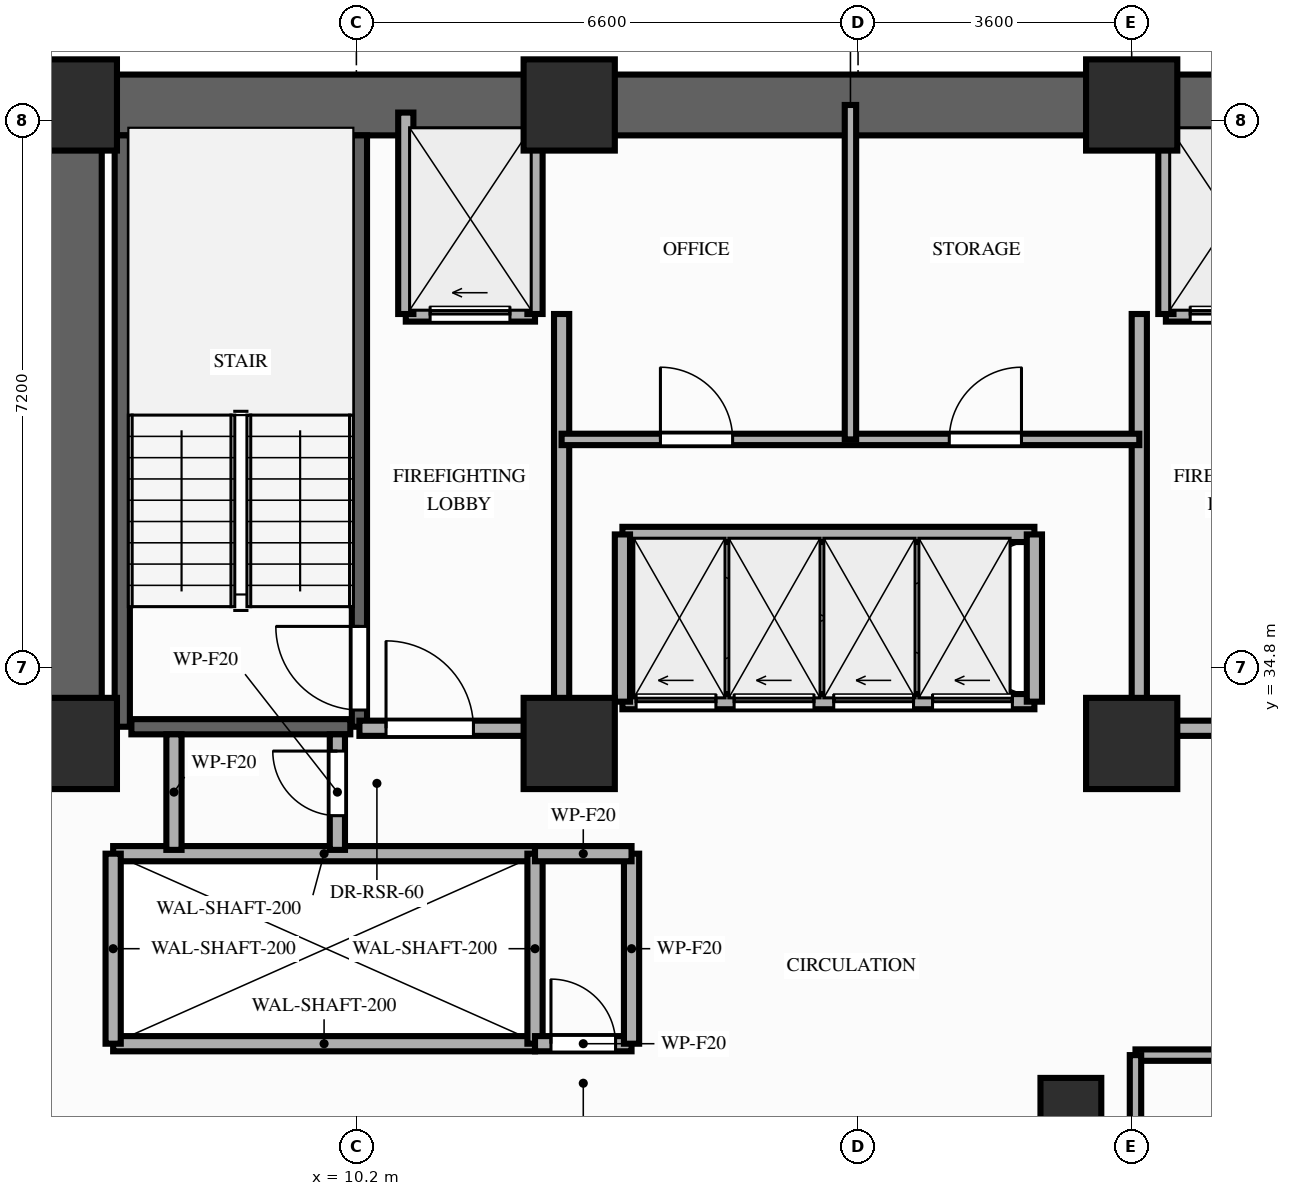
"""IFC4 building model, lengths in metres.
Left out: names, types, materials, properties, quantities, classifications, styles, units other than length and angle.
Written with IfcOpenShell. Run it as: python <this file> out.ifc"""

import sys

from ifc_helpers import new_model, si_unit, direction, frame, frame_2d, origin, origin_2d, place, context, subcontext, project, spatial, rectangle, extrude, element, fill, save


model = new_model("IFC4")
c1 = context("Model", 3, precision=1e-05, world=origin(), true_north=direction((0.0, 1.0)))
c2 = subcontext(c1, "Body", "Model", "MODEL_VIEW")
j1 = project(units=[si_unit("LENGTHUNIT", "METRE"), si_unit("PLANEANGLEUNIT", "RADIAN")], contexts=[c1])
p1 = place(None, origin())
s1 = spatial("IfcSite", under=j1, at=p1, CompositionType="ELEMENT")
p2 = place(p1, origin())
s2 = spatial("IfcBuilding", under=s1, at=p2, CompositionType="ELEMENT")
p3 = place(p2, frame((0.0, 0.0, 99.4)))
s3 = spatial("IfcBuildingStorey", under=s2, at=p3, CompositionType="ELEMENT", Elevation=99.4)
for number, where, z_axis, x_axis in (
    (1, (6.45, 33.8, 0.0), (0.0, 0.0, 1.0), (1.0, 0.0, 0.0)),
    (2, (13.0, 33.8, 0.0), (0.0, 0.0, 1.0), (1.0, 0.0, 0.0)),
    (3, (20.4, 33.8, 0.0), (0.0, 0.0, 1.0), (1.0, 0.0, 0.0)),
    (4, (6.45, 42.2, 0.0), (0.0, 0.0, 1.0), (1.0, 0.0, 0.0)),
    (5, (13.0, 42.2, 0.0), (0.0, 0.0, 1.0), (1.0, 0.0, 0.0)),
    (6, (20.4, 42.2, 0.0), (0.0, 0.0, 1.0), (1.0, 0.0, 0.0)),
):
    element("IfcColumn", number, at=place(p3, frame(where, z_axis=z_axis, x_axis=x_axis)), inside=s3, PredefinedType="COLUMN", context=c2, shape_type="SweptSolid", body=[
        extrude(rectangle(XDim=1.2, YDim=1.2, at=origin_2d()), origin(), (0.0, 0.0, 1.0), 3.2),
    ])
p4 = place(p3, frame((19.6, 28.8, 0.0), z_axis=(0.0, 0.0, 1.0), x_axis=(1.0, 0.0, 0.0)))
e7 = element("IfcColumn", 7, at=p4, inside=s3, PredefinedType="COLUMN", context=c2, shape_type="SweptSolid", body=[
    extrude(rectangle(XDim=0.8, YDim=1.2, at=origin_2d()), origin(), (0.0, 0.0, 1.0), 3.2),
])
p5 = place(p3, frame((6.45, 42.2, 0.0), z_axis=(0.0, 0.0, 1.0), x_axis=(1.0, 0.0, 0.0)))
e8 = element("IfcWall", 8, at=p5, inside=s3, PredefinedType="SHEAR", context=c2, shape_type="SweptSolid", body=[
    extrude(rectangle(XDim=20.45, YDim=0.8, at=frame_2d((10.225, 0.0))), origin(), (0.0, 0.0, 1.0), 2.96),
])
p6 = place(p3, frame((6.45, 33.8, 0.0), z_axis=(0.0, 0.0, 1.0), x_axis=(0.0, 1.0, 0.0)))
e9 = element("IfcWall", 9, at=p6, inside=s3, PredefinedType="SHEAR", context=c2, shape_type="SweptSolid", body=[
    extrude(rectangle(XDim=7.95, YDim=0.8, at=frame_2d((3.975, 0.0))), origin(), (0.0, 0.0, 1.0), 2.96),
])
p7 = place(p3, frame((7.12, 34.02, 0.0), z_axis=(0.0, 0.0, 1.0), x_axis=(0.0, 1.0, 0.0)))
e10 = element("IfcWall", 10, at=p7, inside=s3, PredefinedType="SHEAR", context=c2, shape_type="SweptSolid", body=[
    extrude(rectangle(XDim=7.78, YDim=0.2, at=frame_2d((3.89, 0.0))), origin(), (0.0, 0.0, 1.0), 2.96),
])
p8 = place(p3, frame((10.24, 34.02, 0.0), z_axis=(0.0, 0.0, 1.0), x_axis=(0.0, 1.0, 0.0)))
e11 = element("IfcWall", 11, at=p8, inside=s3, PredefinedType="SHEAR", context=c2, shape_type="SweptSolid", body=[
    extrude(rectangle(XDim=7.78, YDim=0.2, at=frame_2d((3.89, 0.0))), origin(), (0.0, 0.0, 1.0), 2.96),
])
p9 = place(p8, frame((0.22, 0.0, 0.0)))
e12 = element("IfcOpeningElement", 12, at=p9, cuts=e11, PredefinedType="OPENING", context=c2, shape_type="SweptSolid", body=[
    extrude(rectangle(XDim=1.1, YDim=2.15, at=frame_2d((0.55, 1.075))), frame((0.0, 0.11, 0.0), z_axis=(0.0, -1.0, 0.0), x_axis=(1.0, 0.0, 0.0)), (0.0, 0.0, 1.0), 0.22),
])
p10 = place(p3, frame((7.24, 34.02, 0.0), z_axis=(0.0, 0.0, 1.0), x_axis=(1.0, 0.0, 0.0)))
e13 = element("IfcWall", 13, at=p10, inside=s3, PredefinedType="SHEAR", context=c2, shape_type="SweptSolid", body=[
    extrude(rectangle(XDim=2.88, YDim=0.2, at=frame_2d((1.44, 0.0))), origin(), (0.0, 0.0, 1.0), 2.96),
])
for number, where, z_axis, x_axis in (
    (14, (7.0, 29.85, 0.0), (0.0, 0.0, 1.0), (1.0, 0.0, 0.0)),
    (15, (7.0, 32.35, 0.0), (0.0, 0.0, 1.0), (1.0, 0.0, 0.0)),
):
    element("IfcWall", number, at=place(p3, frame(where, z_axis=z_axis, x_axis=x_axis)), inside=s3, PredefinedType="MOVABLE", context=c2, shape_type="SweptSolid", body=[
        extrude(rectangle(XDim=5.55, YDim=0.2, at=frame_2d((2.775, 0.0))), origin(), (0.0, 0.0, 1.0), 2.96),
    ])
for number, where, z_axis, x_axis in (
    (16, (7.0, 29.85, 0.0), (0.0, 0.0, 1.0), (0.0, 1.0, 0.0)),
    (17, (12.55, 29.85, 0.0), (0.0, 0.0, 1.0), (0.0, 1.0, 0.0)),
):
    element("IfcWall", number, at=place(p3, frame(where, z_axis=z_axis, x_axis=x_axis)), inside=s3, PredefinedType="MOVABLE", context=c2, shape_type="SweptSolid", body=[
        extrude(rectangle(XDim=2.5, YDim=0.2, at=frame_2d((1.25, 0.0))), origin(), (0.0, 0.0, 1.0), 2.96),
    ])
p11 = place(p3, frame((10.85, 39.45, 0.0), z_axis=(0.0, 0.0, 1.0), x_axis=(1.0, 0.0, 0.0)))
e18 = element("IfcWall", 18, at=p11, inside=s3, PredefinedType="MOVABLE", context=c2, shape_type="SweptSolid", body=[
    extrude(rectangle(XDim=1.7, YDim=0.2, at=frame_2d((0.85, 0.0))), origin(), (0.0, 0.0, 1.0), 2.96),
])
p12 = place(p11, frame((0.32, 0.0, 0.0)))
e19 = element("IfcOpeningElement", 19, at=p12, cuts=e18, PredefinedType="OPENING", context=c2, shape_type="SweptSolid", body=[
    extrude(rectangle(XDim=1.05, YDim=2.15, at=frame_2d((0.525, 1.075))), frame((0.0, 0.11, 0.0), z_axis=(0.0, -1.0, 0.0), x_axis=(1.0, 0.0, 0.0)), (0.0, 0.0, 1.0), 0.22),
])
p13 = place(p3, frame((20.85, 39.45, 0.0), z_axis=(0.0, 0.0, 1.0), x_axis=(1.0, 0.0, 0.0)))
e20 = element("IfcWall", 20, at=p13, inside=s3, PredefinedType="MOVABLE", context=c2, shape_type="SweptSolid", body=[
    extrude(rectangle(XDim=1.7, YDim=0.2, at=frame_2d((0.85, 0.0))), origin(), (0.0, 0.0, 1.0), 2.96),
])
p14 = place(p13, frame((0.32, 0.0, 0.0)))
e21 = element("IfcOpeningElement", 21, at=p14, cuts=e20, PredefinedType="OPENING", context=c2, shape_type="SweptSolid", body=[
    extrude(rectangle(XDim=1.05, YDim=2.15, at=frame_2d((0.525, 1.075))), frame((0.0, 0.11, 0.0), z_axis=(0.0, -1.0, 0.0), x_axis=(1.0, 0.0, 0.0)), (0.0, 0.0, 1.0), 0.22),
])
for number, where, z_axis, x_axis in (
    (22, (10.85, 39.45, 0.0), (0.0, 0.0, 1.0), (0.0, 1.0, 0.0)),
    (23, (12.55, 39.45, 0.0), (0.0, 0.0, 1.0), (0.0, 1.0, 0.0)),
):
    element("IfcWall", number, at=place(p3, frame(where, z_axis=z_axis, x_axis=x_axis)), inside=s3, PredefinedType="MOVABLE", context=c2, shape_type="SweptSolid", body=[
        extrude(rectangle(XDim=2.65, YDim=0.2, at=frame_2d((1.325, 0.0))), origin(), (0.0, 0.0, 1.0), 2.35),
    ])
p15 = place(p3, frame((12.9, 34.0, 0.0), z_axis=(0.0, 0.0, 1.0), x_axis=(0.0, 1.0, 0.0)))
e24 = element("IfcWall", 24, at=p15, inside=s3, PredefinedType="PARTITIONING", context=c2, shape_type="SweptSolid", body=[
    extrude(rectangle(XDim=5.45, YDim=0.2, at=frame_2d((2.725, 0.0))), origin(), (0.0, 0.0, 1.0), 2.35),
])
p16 = place(p3, frame((10.24, 34.0, 0.0), z_axis=(0.0, 0.0, 1.0), x_axis=(1.0, 0.0, 0.0)))
e25 = element("IfcWall", 25, at=p16, inside=s3, PredefinedType="PARTITIONING", context=c2, shape_type="SweptSolid", body=[
    extrude(rectangle(XDim=2.66, YDim=0.2, at=frame_2d((1.33, 0.0))), origin(), (0.0, 0.0, 1.0), 2.35),
])
p17 = place(p16, frame((0.35, 0.0, 0.0)))
e26 = element("IfcOpeningElement", 26, at=p17, cuts=e25, PredefinedType="OPENING", context=c2, shape_type="SweptSolid", body=[
    extrude(rectangle(XDim=1.15, YDim=2.15, at=frame_2d((0.575, 1.075))), frame((0.0, 0.11, 0.0), z_axis=(0.0, -1.0, 0.0), x_axis=(1.0, 0.0, 0.0)), (0.0, 0.0, 1.0), 0.22),
])
p18 = place(p3, frame((20.85, 39.45, 0.0), z_axis=(0.0, 0.0, 1.0), x_axis=(0.0, 1.0, 0.0)))
e27 = element("IfcWall", 27, at=p18, inside=s3, PredefinedType="MOVABLE", context=c2, shape_type="SweptSolid", body=[
    extrude(rectangle(XDim=2.65, YDim=0.2, at=frame_2d((1.325, 0.0))), origin(), (0.0, 0.0, 1.0), 2.35),
])
p19 = place(p3, frame((20.5, 34.0, 0.0), z_axis=(0.0, 0.0, 1.0), x_axis=(0.0, 1.0, 0.0)))
e28 = element("IfcWall", 28, at=p19, inside=s3, PredefinedType="PARTITIONING", context=c2, shape_type="SweptSolid", body=[
    extrude(rectangle(XDim=5.45, YDim=0.2, at=frame_2d((2.725, 0.0))), origin(), (0.0, 0.0, 1.0), 2.35),
])
p20 = place(p3, frame((20.5, 34.0, 0.0), z_axis=(0.0, 0.0, 1.0), x_axis=(1.0, 0.0, 0.0)))
e29 = element("IfcWall", 29, at=p20, inside=s3, PredefinedType="PARTITIONING", context=c2, shape_type="SweptSolid", body=[
    extrude(rectangle(XDim=2.6, YDim=0.2, at=frame_2d((1.3, 0.0))), origin(), (0.0, 0.0, 1.0), 2.35),
])
p21 = place(p20, frame((1.05, 0.0, 0.0)))
e30 = element("IfcOpeningElement", 30, at=p21, cuts=e29, PredefinedType="OPENING", context=c2, shape_type="SweptSolid", body=[
    extrude(rectangle(XDim=1.15, YDim=2.15, at=frame_2d((0.575, 1.075))), frame((0.0, 0.11, 0.0), z_axis=(0.0, -1.0, 0.0), x_axis=(1.0, 0.0, 0.0)), (0.0, 0.0, 1.0), 0.22),
])
p22 = place(p3, frame((12.55, 29.85, 0.0), z_axis=(0.0, 0.0, 1.0), x_axis=(1.0, 0.0, 0.0)))
e31 = element("IfcWall", 31, at=p22, inside=s3, PredefinedType="PARTITIONING", context=c2, shape_type="SweptSolid", body=[
    extrude(rectangle(XDim=1.27, YDim=0.2, at=frame_2d((0.635, 0.0))), origin(), (0.0, 0.0, 1.0), 2.96),
])
p23 = place(p22, frame((0.21, 0.0, 0.0)))
e32 = element("IfcOpeningElement", 32, at=p23, cuts=e31, PredefinedType="OPENING", context=c2, shape_type="SweptSolid", body=[
    extrude(rectangle(XDim=0.85, YDim=2.05, at=frame_2d((0.425, 1.025))), frame((0.0, 0.11, 0.0), z_axis=(0.0, -1.0, 0.0), x_axis=(1.0, 0.0, 0.0)), (0.0, 0.0, 1.0), 0.22),
])
p24 = place(p3, frame((13.82, 29.85, 0.0), z_axis=(0.0, 0.0, 1.0), x_axis=(0.0, 1.0, 0.0)))
e33 = element("IfcWall", 33, at=p24, inside=s3, PredefinedType="PARTITIONING", context=c2, shape_type="SweptSolid", body=[
    extrude(rectangle(XDim=2.5, YDim=0.2, at=frame_2d((1.25, 0.0))), origin(), (0.0, 0.0, 1.0), 2.96),
])
p25 = place(p3, frame((12.55, 32.35, 0.0), z_axis=(0.0, 0.0, 1.0), x_axis=(1.0, 0.0, 0.0)))
e34 = element("IfcWall", 34, at=p25, inside=s3, PredefinedType="PARTITIONING", context=c2, shape_type="SweptSolid", body=[
    extrude(rectangle(XDim=1.27, YDim=0.2, at=frame_2d((0.635, 0.0))), origin(), (0.0, 0.0, 1.0), 2.96),
])
p26 = place(p3, frame((7.8, 32.4, 0.0), z_axis=(0.0, 0.0, 1.0), x_axis=(0.0, 1.0, 0.0)))
e35 = element("IfcWall", 35, at=p26, inside=s3, PredefinedType="PARTITIONING", context=c2, shape_type="SweptSolid", body=[
    extrude(rectangle(XDim=1.52, YDim=0.2, at=frame_2d((0.76, 0.0))), origin(), (0.0, 0.0, 1.0), 2.35),
])
p27 = place(p3, frame((9.95, 32.4, 0.0), z_axis=(0.0, 0.0, 1.0), x_axis=(0.0, 1.0, 0.0)))
e36 = element("IfcWall", 36, at=p27, inside=s3, PredefinedType="PARTITIONING", context=c2, shape_type="SweptSolid", body=[
    extrude(rectangle(XDim=1.52, YDim=0.2, at=frame_2d((0.76, 0.0))), origin(), (0.0, 0.0, 1.0), 2.35),
])
p28 = place(p27, frame((0.45, 0.0, 0.0)))
e37 = element("IfcOpeningElement", 37, at=p28, cuts=e36, PredefinedType="OPENING", context=c2, shape_type="SweptSolid", body=[
    extrude(rectangle(XDim=0.85, YDim=2.05, at=frame_2d((0.425, 1.025))), frame((0.0, 0.11, 0.0), z_axis=(0.0, -1.0, 0.0), x_axis=(1.0, 0.0, 0.0)), (0.0, 0.0, 1.0), 0.22),
])
p29 = place(p3, frame((12.9, 37.8, 0.0), z_axis=(0.0, 0.0, 1.0), x_axis=(1.0, 0.0, 0.0)))
e38 = element("IfcWall", 38, at=p29, inside=s3, PredefinedType="PARTITIONING", context=c2, shape_type="SweptSolid", body=[
    extrude(rectangle(XDim=7.6, YDim=0.15, at=frame_2d((3.8, 0.0))), origin(), (0.0, 0.0, 1.0), 2.96),
])
p30 = place(p29, frame((1.3, 0.0, 0.0)))
e39 = element("IfcOpeningElement", 39, at=p30, cuts=e38, PredefinedType="OPENING", context=c2, shape_type="SweptSolid", body=[
    extrude(rectangle(XDim=0.95, YDim=2.15, at=frame_2d((0.475, 1.075))), frame((0.0, 0.085, 0.0), z_axis=(0.0, -1.0, 0.0), x_axis=(1.0, 0.0, 0.0)), (0.0, 0.0, 1.0), 0.17),
])
p31 = place(p29, frame((5.1, 0.0, 0.0)))
e40 = element("IfcOpeningElement", 40, at=p31, cuts=e38, PredefinedType="OPENING", context=c2, shape_type="SweptSolid", body=[
    extrude(rectangle(XDim=0.95, YDim=2.15, at=frame_2d((0.475, 1.075))), frame((0.0, 0.085, 0.0), z_axis=(0.0, -1.0, 0.0), x_axis=(1.0, 0.0, 0.0)), (0.0, 0.0, 1.0), 0.17),
])
p32 = place(p3, frame((16.7, 37.8, 0.0), z_axis=(0.0, 0.0, 1.0), x_axis=(0.0, 1.0, 0.0)))
e41 = element("IfcWall", 41, at=p32, inside=s3, PredefinedType="PARTITIONING", context=c2, shape_type="SweptSolid", body=[
    extrude(rectangle(XDim=4.4, YDim=0.15, at=frame_2d((2.2, 0.0))), origin(), (0.0, 0.0, 1.0), 2.35),
])
p33 = place(p3, frame((13.7, 34.35, 0.0), z_axis=(0.0, 0.0, 1.0), x_axis=(1.0, 0.0, 0.0)))
e42 = element("IfcWall", 42, at=p33, inside=s3, PredefinedType="MOVABLE", context=c2, shape_type="SweptSolid", body=[
    extrude(rectangle(XDim=5.42, YDim=0.2, at=frame_2d((2.71, 0.0))), origin(), (0.0, 0.0, 1.0), 2.96),
])
p34 = place(p33, frame((0.18, 0.0, 0.0)))
e43 = element("IfcOpeningElement", 43, at=p34, cuts=e42, PredefinedType="OPENING", context=c2, shape_type="SweptSolid", body=[
    extrude(rectangle(XDim=1.05, YDim=2.15, at=frame_2d((0.525, 1.075))), frame((0.0, 0.11, 0.0), z_axis=(0.0, -1.0, 0.0), x_axis=(1.0, 0.0, 0.0)), (0.0, 0.0, 1.0), 0.22),
])
p35 = place(p33, frame((1.47, 0.0, 0.0)))
e44 = element("IfcOpeningElement", 44, at=p35, cuts=e42, PredefinedType="OPENING", context=c2, shape_type="SweptSolid", body=[
    extrude(rectangle(XDim=1.05, YDim=2.15, at=frame_2d((0.525, 1.075))), frame((0.0, 0.11, 0.0), z_axis=(0.0, -1.0, 0.0), x_axis=(1.0, 0.0, 0.0)), (0.0, 0.0, 1.0), 0.22),
])
p36 = place(p33, frame((2.78, 0.0, 0.0)))
e45 = element("IfcOpeningElement", 45, at=p36, cuts=e42, PredefinedType="OPENING", context=c2, shape_type="SweptSolid", body=[
    extrude(rectangle(XDim=1.05, YDim=2.15, at=frame_2d((0.525, 1.075))), frame((0.0, 0.11, 0.0), z_axis=(0.0, -1.0, 0.0), x_axis=(1.0, 0.0, 0.0)), (0.0, 0.0, 1.0), 0.22),
])
p37 = place(p33, frame((4.08, 0.0, 0.0)))
e46 = element("IfcOpeningElement", 46, at=p37, cuts=e42, PredefinedType="OPENING", context=c2, shape_type="SweptSolid", body=[
    extrude(rectangle(XDim=1.05, YDim=2.15, at=frame_2d((0.525, 1.075))), frame((0.0, 0.11, 0.0), z_axis=(0.0, -1.0, 0.0), x_axis=(1.0, 0.0, 0.0)), (0.0, 0.0, 1.0), 0.22),
])
p38 = place(p3, frame((13.7, 36.55, 0.0), z_axis=(0.0, 0.0, 1.0), x_axis=(1.0, 0.0, 0.0)))
e47 = element("IfcWall", 47, at=p38, inside=s3, PredefinedType="MOVABLE", context=c2, shape_type="SweptSolid", body=[
    extrude(rectangle(XDim=5.42, YDim=0.2, at=frame_2d((2.71, 0.0))), origin(), (0.0, 0.0, 1.0), 2.96),
])
for number, where, z_axis, x_axis in (
    (48, (13.7, 34.35, 0.0), (0.0, 0.0, 1.0), (0.0, 1.0, 0.0)),
    (49, (19.12, 34.35, 0.0), (0.0, 0.0, 1.0), (0.0, 1.0, 0.0)),
):
    element("IfcWall", number, at=place(p3, frame(where, z_axis=z_axis, x_axis=x_axis)), inside=s3, PredefinedType="MOVABLE", context=c2, shape_type="SweptSolid", body=[
        extrude(rectangle(XDim=2.2, YDim=0.2, at=frame_2d((1.1, 0.0))), origin(), (0.0, 0.0, 1.0), 2.96),
    ])
p39 = place(p3, frame((20.45, 29.7, 0.0), z_axis=(0.0, 0.0, 1.0), x_axis=(1.0, 0.0, 0.0)))
e50 = element("IfcWall", 50, at=p39, inside=s3, PredefinedType="PARTITIONING", context=c2, shape_type="SweptSolid", body=[
    extrude(rectangle(XDim=6.7, YDim=0.15, at=frame_2d((3.35, 0.0))), origin(), (0.0, 0.0, 1.0), 2.96),
])
p40 = place(p39, frame((2.8, 0.0, 0.0)))
e51 = element("IfcOpeningElement", 51, at=p40, cuts=e50, PredefinedType="OPENING", context=c2, shape_type="SweptSolid", body=[
    extrude(rectangle(XDim=0.95, YDim=2.15, at=frame_2d((0.475, 1.075))), frame((0.0, 0.085, 0.0), z_axis=(0.0, -1.0, 0.0), x_axis=(1.0, 0.0, 0.0)), (0.0, 0.0, 1.0), 0.17),
])
p41 = place(p3, frame((20.45, 26.75, 0.0), z_axis=(0.0, 0.0, 1.0), x_axis=(0.0, 1.0, 0.0)))
e52 = element("IfcWall", 52, at=p41, inside=s3, PredefinedType="PARTITIONING", context=c2, shape_type="SweptSolid", body=[
    extrude(rectangle(XDim=2.95, YDim=0.15, at=frame_2d((1.475, 0.0))), origin(), (0.0, 0.0, 1.0), 2.35),
])
p42 = place(p9, origin())
e53 = element("IfcDoor", 53, at=p42, inside=s3, OperationType="SINGLE_SWING_RIGHT", PredefinedType="DOOR", context=c2, shape_type="SweptSolid", body=[
    extrude(rectangle(XDim=1.1, YDim=2.15, at=frame_2d((0.55, 1.075))), frame((0.0, 0.025, 0.0), z_axis=(0.0, -1.0, 0.0), x_axis=(1.0, 0.0, 0.0)), (0.0, 0.0, 1.0), 0.05),
])
fill(e12, e53)
p43 = place(p12, origin())
e54 = element("IfcDoor", 54, at=p43, inside=s3, OperationType="SLIDING_TO_LEFT", PredefinedType="DOOR", context=c2, shape_type="SweptSolid", body=[
    extrude(rectangle(XDim=1.05, YDim=2.15, at=frame_2d((0.525, 1.075))), frame((0.0, 0.025, 0.0), z_axis=(0.0, -1.0, 0.0), x_axis=(1.0, 0.0, 0.0)), (0.0, 0.0, 1.0), 0.05),
])
fill(e19, e54)
p44 = place(p14, origin())
e55 = element("IfcDoor", 55, at=p44, inside=s3, OperationType="SLIDING_TO_LEFT", PredefinedType="DOOR", context=c2, shape_type="SweptSolid", body=[
    extrude(rectangle(XDim=1.05, YDim=2.15, at=frame_2d((0.525, 1.075))), frame((0.0, 0.025, 0.0), z_axis=(0.0, -1.0, 0.0), x_axis=(1.0, 0.0, 0.0)), (0.0, 0.0, 1.0), 0.05),
])
fill(e21, e55)
p45 = place(p17, origin())
e56 = element("IfcDoor", 56, at=p45, inside=s3, OperationType="SINGLE_SWING_LEFT", PredefinedType="DOOR", context=c2, shape_type="SweptSolid", body=[
    extrude(rectangle(XDim=1.15, YDim=2.15, at=frame_2d((0.575, 1.075))), frame((0.0, 0.025, 0.0), z_axis=(0.0, -1.0, 0.0), x_axis=(1.0, 0.0, 0.0)), (0.0, 0.0, 1.0), 0.05),
])
fill(e26, e56)
p46 = place(p23, origin())
e57 = element("IfcDoor", 57, at=p46, inside=s3, OperationType="SINGLE_SWING_LEFT", PredefinedType="DOOR", context=c2, shape_type="SweptSolid", body=[
    extrude(rectangle(XDim=0.85, YDim=2.05, at=frame_2d((0.425, 1.025))), frame((0.0, 0.025, 0.0), z_axis=(0.0, -1.0, 0.0), x_axis=(1.0, 0.0, 0.0)), (0.0, 0.0, 1.0), 0.05),
])
fill(e32, e57)
p47 = place(p28, origin())
e58 = element("IfcDoor", 58, at=p47, inside=s3, OperationType="SINGLE_SWING_RIGHT", PredefinedType="DOOR", context=c2, shape_type="SweptSolid", body=[
    extrude(rectangle(XDim=0.85, YDim=2.05, at=frame_2d((0.425, 1.025))), frame((0.0, 0.025, 0.0), z_axis=(0.0, -1.0, 0.0), x_axis=(1.0, 0.0, 0.0)), (0.0, 0.0, 1.0), 0.05),
])
fill(e37, e58)
p48 = place(p30, origin())
e59 = element("IfcDoor", 59, at=p48, inside=s3, OperationType="SINGLE_SWING_LEFT", PredefinedType="DOOR", context=c2, shape_type="SweptSolid", body=[
    extrude(rectangle(XDim=0.95, YDim=2.15, at=frame_2d((0.475, 1.075))), frame((0.0, 0.025, 0.0), z_axis=(0.0, -1.0, 0.0), x_axis=(1.0, 0.0, 0.0)), (0.0, 0.0, 1.0), 0.05),
])
fill(e39, e59)
p49 = place(p31, origin())
e60 = element("IfcDoor", 60, at=p49, inside=s3, OperationType="SINGLE_SWING_RIGHT", PredefinedType="DOOR", context=c2, shape_type="SweptSolid", body=[
    extrude(rectangle(XDim=0.95, YDim=2.15, at=frame_2d((0.475, 1.075))), frame((0.0, 0.025, 0.0), z_axis=(0.0, -1.0, 0.0), x_axis=(1.0, 0.0, 0.0)), (0.0, 0.0, 1.0), 0.05),
])
fill(e40, e60)
p50 = place(p34, origin())
e61 = element("IfcDoor", 61, at=p50, inside=s3, OperationType="SLIDING_TO_LEFT", PredefinedType="DOOR", context=c2, shape_type="SweptSolid", body=[
    extrude(rectangle(XDim=1.05, YDim=2.15, at=frame_2d((0.525, 1.075))), frame((0.0, 0.025, 0.0), z_axis=(0.0, -1.0, 0.0), x_axis=(1.0, 0.0, 0.0)), (0.0, 0.0, 1.0), 0.05),
])
fill(e43, e61)
p51 = place(p35, origin())
e62 = element("IfcDoor", 62, at=p51, inside=s3, OperationType="SLIDING_TO_LEFT", PredefinedType="DOOR", context=c2, shape_type="SweptSolid", body=[
    extrude(rectangle(XDim=1.05, YDim=2.15, at=frame_2d((0.525, 1.075))), frame((0.0, 0.025, 0.0), z_axis=(0.0, -1.0, 0.0), x_axis=(1.0, 0.0, 0.0)), (0.0, 0.0, 1.0), 0.05),
])
fill(e44, e62)
p52 = place(p36, origin())
e63 = element("IfcDoor", 63, at=p52, inside=s3, OperationType="SLIDING_TO_LEFT", PredefinedType="DOOR", context=c2, shape_type="SweptSolid", body=[
    extrude(rectangle(XDim=1.05, YDim=2.15, at=frame_2d((0.525, 1.075))), frame((0.0, 0.025, 0.0), z_axis=(0.0, -1.0, 0.0), x_axis=(1.0, 0.0, 0.0)), (0.0, 0.0, 1.0), 0.05),
])
fill(e45, e63)
p53 = place(p37, origin())
e64 = element("IfcDoor", 64, at=p53, inside=s3, OperationType="SLIDING_TO_LEFT", PredefinedType="DOOR", context=c2, shape_type="SweptSolid", body=[
    extrude(rectangle(XDim=1.05, YDim=2.15, at=frame_2d((0.525, 1.075))), frame((0.0, 0.025, 0.0), z_axis=(0.0, -1.0, 0.0), x_axis=(1.0, 0.0, 0.0)), (0.0, 0.0, 1.0), 0.05),
])
fill(e46, e64)
save(model, sys.argv[1])
